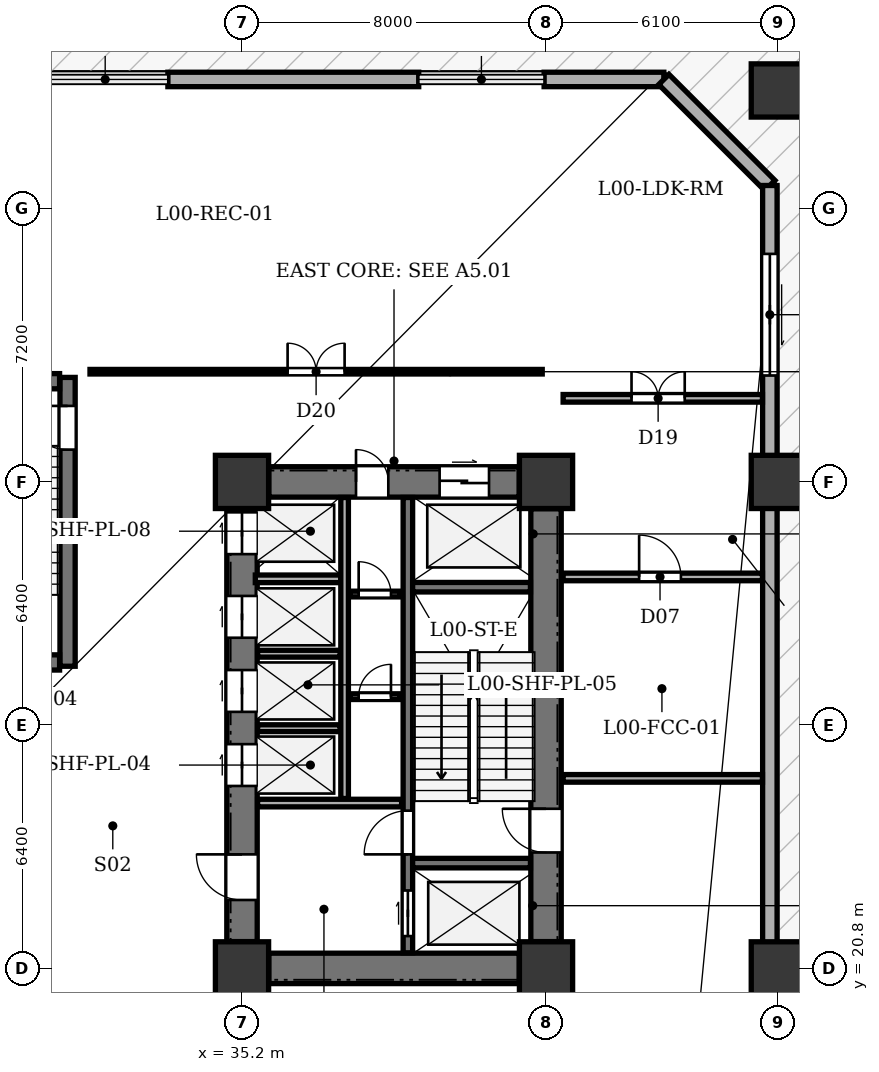
"""IFC4 building model, lengths in metres.
Left out: names, types, materials, properties, quantities, classifications, styles, units other than length and angle.
Written with IfcOpenShell. Run it as: python <this file> out.ifc"""

import sys

from ifc_helpers import new_model, si_unit, direction, frame, frame_2d, origin, origin_2d, place, context, subcontext, project, spatial, rectangle, extrude, element, fill, save


model = new_model("IFC4")
c1 = context("Model", 3, precision=1e-05, world=origin(), true_north=direction((0.0, 1.0)))
c2 = subcontext(c1, "Body", "Model", "MODEL_VIEW")
j1 = project(units=[si_unit("LENGTHUNIT", "METRE"), si_unit("PLANEANGLEUNIT", "RADIAN")], contexts=[c1])
p1 = place(None, origin())
s1 = spatial("IfcSite", under=j1, at=p1, CompositionType="ELEMENT")
p2 = place(p1, origin())
s2 = spatial("IfcBuilding", under=s1, at=p2, CompositionType="ELEMENT")
p3 = place(p2, origin())
s3 = spatial("IfcBuildingStorey", under=s2, at=p3, CompositionType="ELEMENT", Elevation=0.0)
for number, where, z_axis, x_axis in (
    (1, (35.2, 20.8, 0.0), (0.0, 0.0, 1.0), (1.0, 0.0, 0.0)),
    (2, (43.2, 20.8, 0.0), (0.0, 0.0, 1.0), (1.0, 0.0, 0.0)),
    (3, (35.2, 33.6, 0.0), (0.0, 0.0, 1.0), (1.0, 0.0, 0.0)),
    (4, (43.2, 33.6, 0.0), (0.0, 0.0, 1.0), (1.0, 0.0, 0.0)),
    (5, (49.3, 20.8, 0.0), (0.0, 0.0, 1.0), (1.0, 0.0, 0.0)),
    (6, (49.3, 33.6, 0.0), (0.0, 0.0, 1.0), (1.0, 0.0, 0.0)),
    (7, (49.3, 43.9, 0.0), (0.0, 0.0, 1.0), (1.0, 0.0, 0.0)),
):
    element("IfcColumn", number, at=place(p3, frame(where, z_axis=z_axis, x_axis=x_axis)), inside=s3, PredefinedType="COLUMN", context=c2, shape_type="SweptSolid", body=[
        extrude(rectangle(XDim=1.4, YDim=1.4, at=origin_2d()), origin(), (0.0, 0.0, 1.0), 5.4),
    ])
p4 = place(p3, frame((33.25, 44.19, 0.0), z_axis=(0.0, 0.0, 1.0), x_axis=(1.0, 0.0, 0.0)))
e8 = element("IfcWall", 8, at=p4, inside=s3, PredefinedType="STANDARD", context=c2, shape_type="SweptSolid", body=[
    extrude(rectangle(XDim=6.6, YDim=0.38, at=frame_2d((3.3, 0.0))), origin(), (0.0, 0.0, 1.0), 3.135),
])
p5 = place(p3, frame((43.15, 44.19, 0.0), z_axis=(0.0, 0.0, 1.0), x_axis=(1.0, 0.0, 0.0)))
e9 = element("IfcWall", 9, at=p5, inside=s3, PredefinedType="STANDARD", context=c2, shape_type="SweptSolid", body=[
    extrude(rectangle(XDim=3.15, YDim=0.38, at=frame_2d((1.575, 0.0))), origin(), (0.0, 0.0, 1.0), 3.135),
])
p6 = place(p3, frame((46.3, 44.19, 0.0), z_axis=(0.0, 0.0, 1.0), x_axis=(0.707106781187, -0.707106781187, 0.0)))
e10 = element("IfcWall", 10, at=p6, inside=s3, PredefinedType="STANDARD", context=c2, shape_type="SweptSolid", body=[
    extrude(rectangle(XDim=3.946, YDim=0.38, at=frame_2d((1.973, 0.0))), origin(), (0.0, 0.0, 1.0), 4.95),
])
p7 = place(p3, frame((49.09, 41.4, 0.0), z_axis=(0.0, 0.0, 1.0), x_axis=(0.0, -1.0, 0.0)))
e11 = element("IfcWall", 11, at=p7, inside=s3, PredefinedType="STANDARD", context=c2, shape_type="SweptSolid", body=[
    extrude(rectangle(XDim=28.4, YDim=0.38, at=frame_2d((14.2, 0.0))), origin(), (0.0, 0.0, 1.0), 3.135),
])
p8 = place(p7, frame((23.8, 0.0, 0.0)))
e12 = element("IfcOpeningElement", 12, at=p8, cuts=e11, PredefinedType="OPENING", context=c2, shape_type="SweptSolid", body=[
    extrude(rectangle(XDim=1.8, YDim=2.3, at=frame_2d((0.9, 1.15))), frame((0.0, 0.2, 0.0), z_axis=(0.0, -1.0, 0.0), x_axis=(1.0, 0.0, 0.0)), (0.0, 0.0, 1.0), 0.4),
])
p9 = place(p7, frame((26.2, 0.0, 0.0)))
e13 = element("IfcOpeningElement", 13, at=p9, cuts=e11, PredefinedType="OPENING", context=c2, shape_type="SweptSolid", body=[
    extrude(rectangle(XDim=1.8, YDim=2.3, at=frame_2d((0.9, 1.15))), frame((0.0, 0.2, 0.0), z_axis=(0.0, -1.0, 0.0), x_axis=(1.0, 0.0, 0.0)), (0.0, 0.0, 1.0), 0.4),
])
p10 = place(p7, frame((1.8, 0.0, 0.0)))
e14 = element("IfcOpeningElement", 14, at=p10, cuts=e11, PredefinedType="OPENING", context=c2, shape_type="SweptSolid", body=[
    extrude(rectangle(XDim=3.2, YDim=2.85, at=frame_2d((1.6, 1.425))), frame((0.0, 0.2, 0.0), z_axis=(0.0, -1.0, 0.0), x_axis=(1.0, 0.0, 0.0)), (0.0, 0.0, 1.0), 0.4),
])
p11 = place(p3, frame((43.2, 21.505, 0.0), z_axis=(0.0, 0.0, 1.0), x_axis=(0.0, 1.0, 0.0)))
e15 = element("IfcWall", 15, at=p11, inside=s3, PredefinedType="SHEAR", context=c2, shape_type="SweptSolid", body=[
    extrude(rectangle(XDim=11.39, YDim=0.8, at=frame_2d((5.695, 0.0))), origin(), (0.0, 0.0, 1.0), 4.95),
])
p12 = place(p11, frame((2.345, 0.0, 0.0)))
e16 = element("IfcOpeningElement", 16, at=p12, cuts=e15, PredefinedType="OPENING", context=c2, shape_type="SweptSolid", body=[
    extrude(rectangle(XDim=1.15, YDim=2.15, at=frame_2d((0.575, 1.075))), frame((0.0, 0.41, 0.0), z_axis=(0.0, -1.0, 0.0), x_axis=(1.0, 0.0, 0.0)), (0.0, 0.0, 1.0), 0.82),
])
p13 = place(p3, frame((35.905, 20.8, 0.0), z_axis=(0.0, 0.0, 1.0), x_axis=(1.0, 0.0, 0.0)))
e17 = element("IfcWall", 17, at=p13, inside=s3, PredefinedType="SHEAR", context=c2, shape_type="SweptSolid", body=[
    extrude(rectangle(XDim=6.59, YDim=0.8, at=frame_2d((3.295, 0.0))), origin(), (0.0, 0.0, 1.0), 4.95),
])
p14 = place(p3, frame((35.905, 33.6, 0.0), z_axis=(0.0, 0.0, 1.0), x_axis=(1.0, 0.0, 0.0)))
e18 = element("IfcWall", 18, at=p14, inside=s3, PredefinedType="SHEAR", context=c2, shape_type="SweptSolid", body=[
    extrude(rectangle(XDim=6.59, YDim=0.8, at=frame_2d((3.295, 0.0))), origin(), (0.0, 0.0, 1.0), 4.95),
])
p15 = place(p14, frame((4.495, 0.0, 0.0)))
e19 = element("IfcOpeningElement", 19, at=p15, cuts=e18, PredefinedType="OPENING", context=c2, shape_type="SweptSolid", body=[
    extrude(rectangle(XDim=1.3, YDim=2.15, at=frame_2d((0.65, 1.075))), frame((0.0, 0.41, 0.0), z_axis=(0.0, -1.0, 0.0), x_axis=(1.0, 0.0, 0.0)), (0.0, 0.0, 1.0), 0.82),
])
p16 = place(p14, frame((2.295, 0.0, 0.0)))
e20 = element("IfcOpeningElement", 20, at=p16, cuts=e18, PredefinedType="OPENING", context=c2, shape_type="SweptSolid", body=[
    extrude(rectangle(XDim=0.85, YDim=2.02, at=frame_2d((0.425, 1.01))), frame((0.0, 0.41, 0.0), z_axis=(0.0, -1.0, 0.0), x_axis=(1.0, 0.0, 0.0)), (0.0, 0.0, 1.0), 0.82),
])
p17 = place(p3, frame((35.2, 21.505, 0.0), z_axis=(0.0, 0.0, 1.0), x_axis=(0.0, 1.0, 0.0)))
e21 = element("IfcWall", 21, at=p17, inside=s3, PredefinedType="SHEAR", context=c2, shape_type="SweptSolid", body=[
    extrude(rectangle(XDim=11.39, YDim=0.8, at=frame_2d((5.695, 0.0))), origin(), (0.0, 0.0, 1.0), 4.95),
])
p18 = place(p17, frame((1.095, 0.0, 0.0)))
e22 = element("IfcOpeningElement", 22, at=p18, cuts=e21, PredefinedType="OPENING", context=c2, shape_type="SweptSolid", body=[
    extrude(rectangle(XDim=1.2, YDim=2.15, at=frame_2d((0.6, 1.075))), frame((0.0, 0.41, 0.0), z_axis=(0.0, -1.0, 0.0), x_axis=(1.0, 0.0, 0.0)), (0.0, 0.0, 1.0), 0.82),
])
p19 = place(p17, frame((4.095, 0.0, 0.0)))
e23 = element("IfcOpeningElement", 23, at=p19, cuts=e21, PredefinedType="OPENING", context=c2, shape_type="SweptSolid", body=[
    extrude(rectangle(XDim=1.1, YDim=2.1, at=frame_2d((0.55, 1.05))), frame((0.0, 0.41, 0.0), z_axis=(0.0, -1.0, 0.0), x_axis=(1.0, 0.0, 0.0)), (0.0, 0.0, 1.0), 0.82),
])
p20 = place(p17, frame((6.045, 0.0, 0.0)))
e24 = element("IfcOpeningElement", 24, at=p20, cuts=e21, PredefinedType="OPENING", context=c2, shape_type="SweptSolid", body=[
    extrude(rectangle(XDim=1.1, YDim=2.1, at=frame_2d((0.55, 1.05))), frame((0.0, 0.41, 0.0), z_axis=(0.0, -1.0, 0.0), x_axis=(1.0, 0.0, 0.0)), (0.0, 0.0, 1.0), 0.82),
])
p21 = place(p17, frame((7.995, 0.0, 0.0)))
e25 = element("IfcOpeningElement", 25, at=p21, cuts=e21, PredefinedType="OPENING", context=c2, shape_type="SweptSolid", body=[
    extrude(rectangle(XDim=1.1, YDim=2.1, at=frame_2d((0.55, 1.05))), frame((0.0, 0.41, 0.0), z_axis=(0.0, -1.0, 0.0), x_axis=(1.0, 0.0, 0.0)), (0.0, 0.0, 1.0), 0.82),
])
p22 = place(p17, frame((10.195, 0.0, 0.0)))
e26 = element("IfcOpeningElement", 26, at=p22, cuts=e21, PredefinedType="OPENING", context=c2, shape_type="SweptSolid", body=[
    extrude(rectangle(XDim=1.1, YDim=2.1, at=frame_2d((0.55, 1.05))), frame((0.0, 0.41, 0.0), z_axis=(0.0, -1.0, 0.0), x_axis=(1.0, 0.0, 0.0)), (0.0, 0.0, 1.0), 0.82),
])
p23 = place(p3, frame((39.565, 21.21, 0.0), z_axis=(0.0, 0.0, 1.0), x_axis=(0.0, 1.0, 0.0)))
e27 = element("IfcWall", 27, at=p23, inside=s3, PredefinedType="SHEAR", context=c2, shape_type="SweptSolid", body=[
    extrude(rectangle(XDim=11.98, YDim=0.25, at=frame_2d((5.99, 0.0))), origin(), (0.0, 0.0, 1.0), 4.95),
])
p24 = place(p23, frame((0.44, 0.0, 0.0)))
e28 = element("IfcOpeningElement", 28, at=p24, cuts=e27, PredefinedType="OPENING", context=c2, shape_type="SweptSolid", body=[
    extrude(rectangle(XDim=1.2, YDim=2.15, at=frame_2d((0.6, 1.075))), frame((0.0, 0.135, 0.0), z_axis=(0.0, -1.0, 0.0), x_axis=(1.0, 0.0, 0.0)), (0.0, 0.0, 1.0), 0.27),
])
p25 = place(p23, frame((2.59, 0.0, 0.0)))
e29 = element("IfcOpeningElement", 29, at=p25, cuts=e27, PredefinedType="OPENING", context=c2, shape_type="SweptSolid", body=[
    extrude(rectangle(XDim=1.15, YDim=2.15, at=frame_2d((0.575, 1.075))), frame((0.0, 0.135, 0.0), z_axis=(0.0, -1.0, 0.0), x_axis=(1.0, 0.0, 0.0)), (0.0, 0.0, 1.0), 0.27),
])
for number, where, z_axis, x_axis in (
    (30, (39.69, 23.57, 0.0), (0.0, 0.0, 1.0), (1.0, 0.0, 0.0)),
    (31, (39.69, 30.83, 0.0), (0.0, 0.0, 1.0), (1.0, 0.0, 0.0)),
):
    element("IfcWall", number, at=place(p3, frame(where, z_axis=z_axis, x_axis=x_axis)), inside=s3, PredefinedType="SHEAR", context=c2, shape_type="SweptSolid", body=[
        extrude(rectangle(XDim=3.1, YDim=0.25, at=frame_2d((1.55, 0.0))), origin(), (0.0, 0.0, 1.0), 4.95),
    ])
p26 = place(p3, frame((35.61, 25.15, 0.0), z_axis=(0.0, 0.0, 1.0), x_axis=(1.0, 0.0, 0.0)))
e32 = element("IfcWall", 32, at=p26, inside=s3, PredefinedType="SOLIDWALL", context=c2, shape_type="SweptSolid", body=[
    extrude(rectangle(XDim=3.79, YDim=0.2, at=frame_2d((1.895, 0.0))), origin(), (0.0, 0.0, 1.0), 4.95),
])
p27 = place(p3, frame((35.55, 31.05, 0.0), z_axis=(0.0, 0.0, 1.0), x_axis=(1.0, 0.0, 0.0)))
e33 = element("IfcWall", 33, at=p27, inside=s3, PredefinedType="SOLIDWALL", context=c2, shape_type="SweptSolid", body=[
    extrude(rectangle(XDim=2.25, YDim=0.2, at=frame_2d((1.125, 0.0))), origin(), (0.0, 0.0, 1.0), 4.95),
])
p28 = place(p3, frame((37.9, 25.27, 0.0), z_axis=(0.0, 0.0, 1.0), x_axis=(0.0, 1.0, 0.0)))
e34 = element("IfcWall", 34, at=p28, inside=s3, PredefinedType="SOLIDWALL", context=c2, shape_type="SweptSolid", body=[
    extrude(rectangle(XDim=7.92, YDim=0.2, at=frame_2d((3.96, 0.0))), origin(), (0.0, 0.0, 1.0), 4.95),
])
for number, where, z_axis, x_axis in (
    (35, (35.61, 27.12, 0.0), (0.0, 0.0, 1.0), (1.0, 0.0, 0.0)),
    (36, (35.61, 29.08, 0.0), (0.0, 0.0, 1.0), (1.0, 0.0, 0.0)),
):
    element("IfcWall", number, at=place(p3, frame(where, z_axis=z_axis, x_axis=x_axis)), inside=s3, PredefinedType="PARTITIONING", context=c2, shape_type="SweptSolid", body=[
        extrude(rectangle(XDim=2.17, YDim=0.18, at=frame_2d((1.085, 0.0))), origin(), (0.0, 0.0, 1.0), 4.95),
    ])
p29 = place(p3, frame((30.61, 28.75, 0.0), z_axis=(0.0, 0.0, 1.0), x_axis=(0.0, 1.0, 0.0)))
e37 = element("IfcWall", 37, at=p29, inside=s3, PredefinedType="SHEAR", context=c2, shape_type="SweptSolid", body=[
    extrude(rectangle(XDim=7.6, YDim=0.4, at=frame_2d((3.8, 0.0))), origin(), (0.0, 0.0, 1.0), 4.95),
])
p30 = place(p29, frame((5.7, 0.0, 0.0)))
e38 = element("IfcOpeningElement", 38, at=p30, cuts=e37, PredefinedType="OPENING", context=c2, shape_type="SweptSolid", body=[
    extrude(rectangle(XDim=1.15, YDim=2.15, at=frame_2d((0.575, 1.075))), frame((0.0, 0.21, 0.0), z_axis=(0.0, -1.0, 0.0), x_axis=(1.0, 0.0, 0.0)), (0.0, 0.0, 1.0), 0.42),
])
for number, where, z_axis, x_axis in (
    (39, (27.2, 28.85, 0.0), (0.0, 0.0, 1.0), (1.0, 0.0, 0.0)),
    (40, (27.2, 36.25, 0.0), (0.0, 0.0, 1.0), (1.0, 0.0, 0.0)),
):
    element("IfcWall", number, at=place(p3, frame(where, z_axis=z_axis, x_axis=x_axis)), inside=s3, PredefinedType="SHEAR", context=c2, shape_type="SweptSolid", body=[
        extrude(rectangle(XDim=3.2, YDim=0.4, at=frame_2d((1.6, 0.0))), origin(), (0.0, 0.0, 1.0), 4.95),
    ])
p31 = place(p3, frame((38.05, 27.95, 0.0), z_axis=(0.0, 0.0, 1.0), x_axis=(1.0, 0.0, 0.0)))
e41 = element("IfcWall", 41, at=p31, inside=s3, PredefinedType="PARTITIONING", context=c2, shape_type="SweptSolid", body=[
    extrude(rectangle(XDim=1.3, YDim=0.15, at=frame_2d((0.65, 0.0))), origin(), (0.0, 0.0, 1.0), 4.95),
])
p32 = place(p31, frame((0.22, 0.0, 0.0)))
e42 = element("IfcOpeningElement", 42, at=p32, cuts=e41, PredefinedType="OPENING", context=c2, shape_type="SweptSolid", body=[
    extrude(rectangle(XDim=0.85, YDim=2.02, at=frame_2d((0.425, 1.01))), frame((0.0, 0.085, 0.0), z_axis=(0.0, -1.0, 0.0), x_axis=(1.0, 0.0, 0.0)), (0.0, 0.0, 1.0), 0.17),
])
p33 = place(p3, frame((38.05, 30.65, 0.0), z_axis=(0.0, 0.0, 1.0), x_axis=(1.0, 0.0, 0.0)))
e43 = element("IfcWall", 43, at=p33, inside=s3, PredefinedType="PARTITIONING", context=c2, shape_type="SweptSolid", body=[
    extrude(rectangle(XDim=1.3, YDim=0.15, at=frame_2d((0.65, 0.0))), origin(), (0.0, 0.0, 1.0), 4.95),
])
p34 = place(p33, frame((0.22, 0.0, 0.0)))
e44 = element("IfcOpeningElement", 44, at=p34, cuts=e43, PredefinedType="OPENING", context=c2, shape_type="SweptSolid", body=[
    extrude(rectangle(XDim=0.85, YDim=2.02, at=frame_2d((0.425, 1.01))), frame((0.0, 0.085, 0.0), z_axis=(0.0, -1.0, 0.0), x_axis=(1.0, 0.0, 0.0)), (0.0, 0.0, 1.0), 0.17),
])
p35 = place(p3, frame((43.65, 25.8, 0.0), z_axis=(0.0, 0.0, 1.0), x_axis=(1.0, 0.0, 0.0)))
e45 = element("IfcWall", 45, at=p35, inside=s3, PredefinedType="SOLIDWALL", context=c2, shape_type="SweptSolid", body=[
    extrude(rectangle(XDim=5.245, YDim=0.2, at=frame_2d((2.623, 0.0))), origin(), (0.0, 0.0, 1.0), 4.95),
])
p36 = place(p3, frame((43.65, 31.1, 0.0), z_axis=(0.0, 0.0, 1.0), x_axis=(1.0, 0.0, 0.0)))
e46 = element("IfcWall", 46, at=p36, inside=s3, PredefinedType="SOLIDWALL", context=c2, shape_type="SweptSolid", body=[
    extrude(rectangle(XDim=5.245, YDim=0.2, at=frame_2d((2.623, 0.0))), origin(), (0.0, 0.0, 1.0), 4.95),
])
p37 = place(p36, frame((2.0, 0.0, 0.0)))
e47 = element("IfcOpeningElement", 47, at=p37, cuts=e46, PredefinedType="OPENING", context=c2, shape_type="SweptSolid", body=[
    extrude(rectangle(XDim=1.1, YDim=2.15, at=frame_2d((0.55, 1.075))), frame((0.0, 0.11, 0.0), z_axis=(0.0, -1.0, 0.0), x_axis=(1.0, 0.0, 0.0)), (0.0, 0.0, 1.0), 0.22),
])
p38 = place(p3, frame((43.65, 35.8, 0.0), z_axis=(0.0, 0.0, 1.0), x_axis=(1.0, 0.0, 0.0)))
e48 = element("IfcWall", 48, at=p38, inside=s3, PredefinedType="SOLIDWALL", context=c2, shape_type="SweptSolid", body=[
    extrude(rectangle(XDim=5.245, YDim=0.2, at=frame_2d((2.623, 0.0))), origin(), (0.0, 0.0, 1.0), 4.385),
])
p39 = place(p38, frame((1.8, 0.0, 0.0)))
e49 = element("IfcOpeningElement", 49, at=p39, cuts=e48, PredefinedType="OPENING", context=c2, shape_type="SweptSolid", body=[
    extrude(rectangle(XDim=1.4, YDim=2.15, at=frame_2d((0.7, 1.075))), frame((0.0, 0.11, 0.0), z_axis=(0.0, -1.0, 0.0), x_axis=(1.0, 0.0, 0.0)), (0.0, 0.0, 1.0), 0.22),
])
p40 = place(p3, frame((31.2, 36.5, 0.0), z_axis=(0.0, 0.0, 1.0), x_axis=(1.0, 0.0, 0.0)))
e50 = element("IfcWall", 50, at=p40, inside=s3, PredefinedType="PARTITIONING", context=c2, shape_type="SweptSolid", body=[
    extrude(rectangle(XDim=11.9, YDim=0.12, at=frame_2d((5.95, 0.0))), origin(), (0.0, 0.0, 1.0), 4.95),
])
p41 = place(p40, frame((5.2, 0.0, 0.0)))
e51 = element("IfcOpeningElement", 51, at=p41, cuts=e50, PredefinedType="OPENING", context=c2, shape_type="SweptSolid", body=[
    extrude(rectangle(XDim=1.5, YDim=2.15, at=frame_2d((0.75, 1.075))), frame((0.0, 0.07, 0.0), z_axis=(0.0, -1.0, 0.0), x_axis=(1.0, 0.0, 0.0)), (0.0, 0.0, 1.0), 0.14),
])
p42 = place(p10, origin())
e52 = element("IfcDoor", 52, at=p42, inside=s3, OperationType="ROLLINGUP", PredefinedType="DOOR", context=c2, shape_type="SweptSolid", body=[
    extrude(rectangle(XDim=3.2, YDim=2.85, at=frame_2d((1.6, 1.425))), frame((0.0, 0.025, 0.0), z_axis=(0.0, -1.0, 0.0), x_axis=(1.0, 0.0, 0.0)), (0.0, 0.0, 1.0), 0.05),
])
fill(e14, e52)
p43 = place(p12, origin())
e53 = element("IfcDoor", 53, at=p43, inside=s3, OperationType="SINGLE_SWING_RIGHT", PredefinedType="DOOR", context=c2, shape_type="SweptSolid", body=[
    extrude(rectangle(XDim=1.15, YDim=2.15, at=frame_2d((0.575, 1.075))), frame((0.0, 0.025, 0.0), z_axis=(0.0, -1.0, 0.0), x_axis=(1.0, 0.0, 0.0)), (0.0, 0.0, 1.0), 0.05),
])
fill(e16, e53)
p44 = place(p15, origin())
e54 = element("IfcDoor", 54, at=p44, inside=s3, OperationType="DOUBLE_DOOR_SLIDING", PredefinedType="DOOR", context=c2, shape_type="SweptSolid", body=[
    extrude(rectangle(XDim=1.3, YDim=2.15, at=frame_2d((0.65, 1.075))), frame((0.0, 0.025, 0.0), z_axis=(0.0, -1.0, 0.0), x_axis=(1.0, 0.0, 0.0)), (0.0, 0.0, 1.0), 0.05),
])
fill(e19, e54)
p45 = place(p16, origin())
e55 = element("IfcDoor", 55, at=p45, inside=s3, OperationType="SINGLE_SWING_LEFT", PredefinedType="DOOR", context=c2, shape_type="SweptSolid", body=[
    extrude(rectangle(XDim=0.85, YDim=2.02, at=frame_2d((0.425, 1.01))), frame((0.0, 0.025, 0.0), z_axis=(0.0, -1.0, 0.0), x_axis=(1.0, 0.0, 0.0)), (0.0, 0.0, 1.0), 0.05),
])
fill(e20, e55)
p46 = place(p18, origin())
e56 = element("IfcDoor", 56, at=p46, inside=s3, OperationType="SINGLE_SWING_RIGHT", PredefinedType="DOOR", context=c2, shape_type="SweptSolid", body=[
    extrude(rectangle(XDim=1.2, YDim=2.15, at=frame_2d((0.6, 1.075))), frame((0.0, 0.025, 0.0), z_axis=(0.0, -1.0, 0.0), x_axis=(1.0, 0.0, 0.0)), (0.0, 0.0, 1.0), 0.05),
])
fill(e22, e56)
p47 = place(p19, origin())
e57 = element("IfcDoor", 57, at=p47, inside=s3, OperationType="DOUBLE_DOOR_SLIDING", PredefinedType="DOOR", context=c2, shape_type="SweptSolid", body=[
    extrude(rectangle(XDim=1.1, YDim=2.1, at=frame_2d((0.55, 1.05))), frame((0.0, 0.025, 0.0), z_axis=(0.0, -1.0, 0.0), x_axis=(1.0, 0.0, 0.0)), (0.0, 0.0, 1.0), 0.05),
])
fill(e23, e57)
p48 = place(p20, origin())
e58 = element("IfcDoor", 58, at=p48, inside=s3, OperationType="DOUBLE_DOOR_SLIDING", PredefinedType="DOOR", context=c2, shape_type="SweptSolid", body=[
    extrude(rectangle(XDim=1.1, YDim=2.1, at=frame_2d((0.55, 1.05))), frame((0.0, 0.025, 0.0), z_axis=(0.0, -1.0, 0.0), x_axis=(1.0, 0.0, 0.0)), (0.0, 0.0, 1.0), 0.05),
])
fill(e24, e58)
p49 = place(p21, origin())
e59 = element("IfcDoor", 59, at=p49, inside=s3, OperationType="DOUBLE_DOOR_SLIDING", PredefinedType="DOOR", context=c2, shape_type="SweptSolid", body=[
    extrude(rectangle(XDim=1.1, YDim=2.1, at=frame_2d((0.55, 1.05))), frame((0.0, 0.025, 0.0), z_axis=(0.0, -1.0, 0.0), x_axis=(1.0, 0.0, 0.0)), (0.0, 0.0, 1.0), 0.05),
])
fill(e25, e59)
p50 = place(p22, origin())
e60 = element("IfcDoor", 60, at=p50, inside=s3, OperationType="DOUBLE_DOOR_SLIDING", PredefinedType="DOOR", context=c2, shape_type="SweptSolid", body=[
    extrude(rectangle(XDim=1.1, YDim=2.1, at=frame_2d((0.55, 1.05))), frame((0.0, 0.025, 0.0), z_axis=(0.0, -1.0, 0.0), x_axis=(1.0, 0.0, 0.0)), (0.0, 0.0, 1.0), 0.05),
])
fill(e26, e60)
p51 = place(p24, origin())
e61 = element("IfcDoor", 61, at=p51, inside=s3, OperationType="DOUBLE_DOOR_SLIDING", PredefinedType="DOOR", context=c2, shape_type="SweptSolid", body=[
    extrude(rectangle(XDim=1.2, YDim=2.15, at=frame_2d((0.6, 1.075))), frame((0.0, 0.025, 0.0), z_axis=(0.0, -1.0, 0.0), x_axis=(1.0, 0.0, 0.0)), (0.0, 0.0, 1.0), 0.05),
])
fill(e28, e61)
p52 = place(p25, origin())
e62 = element("IfcDoor", 62, at=p52, inside=s3, OperationType="SINGLE_SWING_LEFT", PredefinedType="DOOR", context=c2, shape_type="SweptSolid", body=[
    extrude(rectangle(XDim=1.15, YDim=2.15, at=frame_2d((0.575, 1.075))), frame((0.0, 0.025, 0.0), z_axis=(0.0, -1.0, 0.0), x_axis=(1.0, 0.0, 0.0)), (0.0, 0.0, 1.0), 0.05),
])
fill(e29, e62)
p53 = place(p30, origin())
e63 = element("IfcDoor", 63, at=p53, inside=s3, OperationType="SINGLE_SWING_RIGHT", PredefinedType="DOOR", context=c2, shape_type="SweptSolid", body=[
    extrude(rectangle(XDim=1.15, YDim=2.15, at=frame_2d((0.575, 1.075))), frame((0.0, 0.025, 0.0), z_axis=(0.0, -1.0, 0.0), x_axis=(1.0, 0.0, 0.0)), (0.0, 0.0, 1.0), 0.05),
])
fill(e38, e63)
p54 = place(p32, origin())
e64 = element("IfcDoor", 64, at=p54, inside=s3, OperationType="SINGLE_SWING_RIGHT", PredefinedType="DOOR", context=c2, shape_type="SweptSolid", body=[
    extrude(rectangle(XDim=0.85, YDim=2.02, at=frame_2d((0.425, 1.01))), frame((0.0, 0.025, 0.0), z_axis=(0.0, -1.0, 0.0), x_axis=(1.0, 0.0, 0.0)), (0.0, 0.0, 1.0), 0.05),
])
fill(e42, e64)
p55 = place(p34, origin())
e65 = element("IfcDoor", 65, at=p55, inside=s3, OperationType="SINGLE_SWING_LEFT", PredefinedType="DOOR", context=c2, shape_type="SweptSolid", body=[
    extrude(rectangle(XDim=0.85, YDim=2.02, at=frame_2d((0.425, 1.01))), frame((0.0, 0.025, 0.0), z_axis=(0.0, -1.0, 0.0), x_axis=(1.0, 0.0, 0.0)), (0.0, 0.0, 1.0), 0.05),
])
fill(e44, e65)
p56 = place(p37, origin())
e66 = element("IfcDoor", 66, at=p56, inside=s3, OperationType="SINGLE_SWING_LEFT", PredefinedType="DOOR", context=c2, shape_type="SweptSolid", body=[
    extrude(rectangle(XDim=1.1, YDim=2.15, at=frame_2d((0.55, 1.075))), frame((0.0, 0.025, 0.0), z_axis=(0.0, -1.0, 0.0), x_axis=(1.0, 0.0, 0.0)), (0.0, 0.0, 1.0), 0.05),
])
fill(e47, e66)
p57 = place(p39, origin())
e67 = element("IfcDoor", 67, at=p57, inside=s3, OperationType="DOUBLE_DOOR_SINGLE_SWING", PredefinedType="DOOR", context=c2, shape_type="SweptSolid", body=[
    extrude(rectangle(XDim=1.4, YDim=2.15, at=frame_2d((0.7, 1.075))), frame((0.0, 0.025, 0.0), z_axis=(0.0, -1.0, 0.0), x_axis=(1.0, 0.0, 0.0)), (0.0, 0.0, 1.0), 0.05),
])
fill(e49, e67)
p58 = place(p41, origin())
e68 = element("IfcDoor", 68, at=p58, inside=s3, OperationType="DOUBLE_DOOR_SINGLE_SWING", PredefinedType="DOOR", context=c2, shape_type="SweptSolid", body=[
    extrude(rectangle(XDim=1.5, YDim=2.15, at=frame_2d((0.75, 1.075))), frame((0.0, 0.025, 0.0), z_axis=(0.0, -1.0, 0.0), x_axis=(1.0, 0.0, 0.0)), (0.0, 0.0, 1.0), 0.05),
])
fill(e51, e68)
save(model, sys.argv[1])
